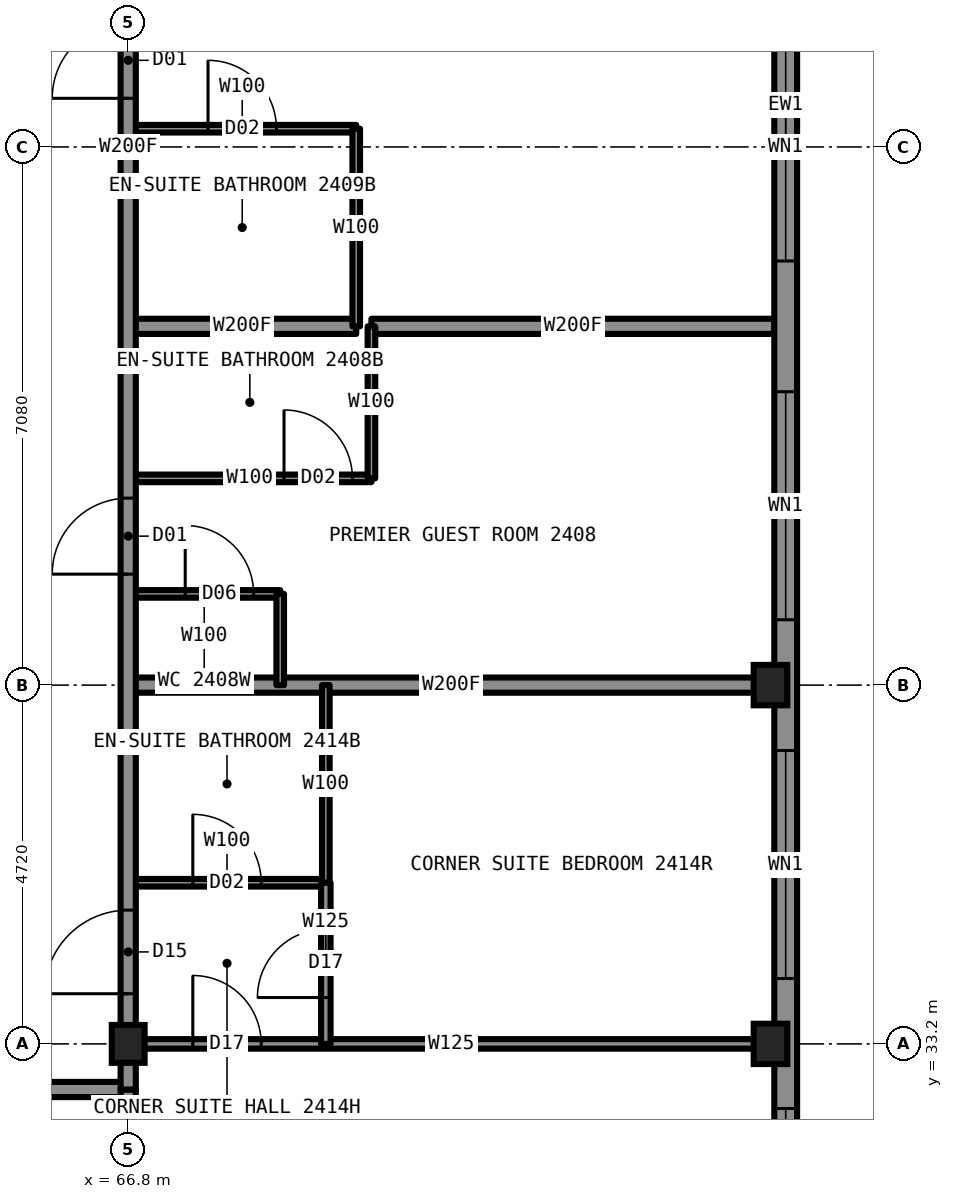
"""IFC4 building model, lengths in metres.
Left out: names, types, materials, properties, quantities, classifications, styles, units other than length and angle.
Written with IfcOpenShell. Run it as: python <this file> out.ifc"""

import sys

from ifc_helpers import new_model, si_unit, direction, frame, frame_2d, origin, origin_2d, place, context, subcontext, project, spatial, rectangle, i_section, extrude, element, fill, save


model = new_model("IFC4")
c1 = context("Model", 3, precision=1e-05, world=origin(), true_north=direction((0.0, 1.0)))
c2 = subcontext(c1, "Body", "Model", "MODEL_VIEW")
j1 = project(units=[si_unit("LENGTHUNIT", "METRE"), si_unit("PLANEANGLEUNIT", "RADIAN")], contexts=[c1])
p1 = place(None, origin())
s1 = spatial("IfcSite", under=j1, at=p1, CompositionType="ELEMENT")
p2 = place(p1, origin())
s2 = spatial("IfcBuilding", under=s1, at=p2, CompositionType="ELEMENT")
p3 = place(p2, frame((0.0, 0.0, 93.4)))
s3 = spatial("IfcBuildingStorey", under=s2, at=p3, CompositionType="ELEMENT", Elevation=93.4)
for number, where, z_axis, x_axis in (
    (1, (75.25, 33.2, 0.0), (0.0, 0.0, 1.0), (1.0, 0.0, 0.0)),
    (2, (75.25, 37.92, 0.0), (0.0, 0.0, 1.0), (1.0, 0.0, 0.0)),
):
    element("IfcColumn", number, at=place(p3, frame(where, z_axis=z_axis, x_axis=x_axis)), inside=s3, PredefinedType="COLUMN", context=c2, shape_type="SweptSolid", body=[
        extrude(i_section(OverallWidth=0.442, OverallDepth=0.531, WebThickness=0.066, FlangeThickness=0.106, at=origin_2d()), origin(), (0.0, 0.0, 1.0), 3.5),
    ])
p4 = place(p3, frame((66.8, 33.2, 0.0), z_axis=(0.0, 0.0, 1.0), x_axis=(1.0, 0.0, 0.0)))
e3 = element("IfcColumn", 3, at=p4, inside=s3, PredefinedType="COLUMN", context=c2, shape_type="SweptSolid", body=[
    extrude(i_section(OverallWidth=0.432, OverallDepth=0.498, WebThickness=0.056, FlangeThickness=0.089, at=origin_2d()), origin(), (0.0, 0.0, 1.0), 3.5),
])
p5 = place(p3, frame((66.8, 33.2, 0.0), z_axis=(0.0, 0.0, 1.0), x_axis=(1.0, 0.0, 0.0)))
e4 = element("IfcWall", 4, at=p5, inside=s3, PredefinedType="PARTITIONING", context=c2, shape_type="SweptSolid", body=[
    extrude(rectangle(XDim=8.5, YDim=0.125, at=frame_2d((4.25, 0.0))), origin(), (0.0, 0.0, 1.0), 2.573),
])
p6 = place(p5, frame((0.85, 0.0, 0.0)))
e5 = element("IfcOpeningElement", 5, at=p6, cuts=e4, PredefinedType="OPENING", context=c2, shape_type="SweptSolid", body=[
    extrude(rectangle(XDim=0.9, YDim=2.2, at=frame_2d((0.45, 1.1))), frame((0.0, 0.073, 0.0), z_axis=(0.0, -1.0, 0.0), x_axis=(1.0, 0.0, 0.0)), (0.0, 0.0, 1.0), 0.145),
])
p7 = place(p3, frame((43.2, 32.6, 0.0), z_axis=(0.0, 0.0, 1.0), x_axis=(1.0, 0.0, 0.0)))
e6 = element("IfcWall", 6, at=p7, inside=s3, PredefinedType="PARTITIONING", context=c2, shape_type="SweptSolid", body=[
    extrude(rectangle(XDim=23.6, YDim=0.2, at=frame_2d((11.8, 0.0))), origin(), (0.0, 0.0, 1.0), 3.33),
])
p8 = place(p7, frame((3.0, 0.0, 0.0)))
e7 = element("IfcOpeningElement", 7, at=p8, cuts=e6, PredefinedType="OPENING", context=c2, shape_type="SweptSolid", body=[
    extrude(rectangle(XDim=1.0, YDim=2.2, at=frame_2d((0.5, 1.1))), frame((0.0, 0.11, 0.0), z_axis=(0.0, -1.0, 0.0), x_axis=(1.0, 0.0, 0.0)), (0.0, 0.0, 1.0), 0.22),
])
p9 = place(p7, frame((9.84, 0.0, 0.0)))
e8 = element("IfcOpeningElement", 8, at=p9, cuts=e6, PredefinedType="OPENING", context=c2, shape_type="SweptSolid", body=[
    extrude(rectangle(XDim=1.0, YDim=2.2, at=frame_2d((0.5, 1.1))), frame((0.0, 0.11, 0.0), z_axis=(0.0, -1.0, 0.0), x_axis=(1.0, 0.0, 0.0)), (0.0, 0.0, 1.0), 0.22),
])
p10 = place(p7, frame((17.16, 0.0, 0.0)))
e9 = element("IfcOpeningElement", 9, at=p10, cuts=e6, PredefinedType="OPENING", context=c2, shape_type="SweptSolid", body=[
    extrude(rectangle(XDim=1.0, YDim=2.2, at=frame_2d((0.5, 1.1))), frame((0.0, 0.11, 0.0), z_axis=(0.0, -1.0, 0.0), x_axis=(1.0, 0.0, 0.0)), (0.0, 0.0, 1.0), 0.22),
])
p11 = place(p3, frame((66.8, 42.64, 0.0), z_axis=(0.0, 0.0, 1.0), x_axis=(1.0, 0.0, 0.0)))
e10 = element("IfcWall", 10, at=p11, inside=s3, PredefinedType="PARTITIONING", context=c2, shape_type="SweptSolid", body=[
    extrude(rectangle(XDim=3.0, YDim=0.2, at=frame_2d((1.5, 0.0))), origin(), (0.0, 0.0, 1.0), 2.731),
])
p12 = place(p3, frame((70.0, 42.64, 0.0), z_axis=(0.0, 0.0, 1.0), x_axis=(1.0, 0.0, 0.0)))
e11 = element("IfcWall", 11, at=p12, inside=s3, PredefinedType="PARTITIONING", context=c2, shape_type="SweptSolid", body=[
    extrude(rectangle(XDim=5.3, YDim=0.2, at=frame_2d((2.65, 0.0))), origin(), (0.0, 0.0, 1.0), 2.731),
])
p13 = place(p3, frame((66.8, 40.64, 0.0), z_axis=(0.0, 0.0, 1.0), x_axis=(1.0, 0.0, 0.0)))
e12 = element("IfcWall", 12, at=p13, inside=s3, PredefinedType="PARTITIONING", context=c2, shape_type="SweptSolid", body=[
    extrude(rectangle(XDim=3.2, YDim=0.1, at=frame_2d((1.6, 0.0))), origin(), (0.0, 0.0, 1.0), 3.33),
])
p14 = place(p13, frame((2.05, 0.0, 0.0)))
e13 = element("IfcOpeningElement", 13, at=p14, cuts=e12, PredefinedType="OPENING", context=c2, shape_type="SweptSolid", body=[
    extrude(rectangle(XDim=0.9, YDim=2.1, at=frame_2d((0.45, 1.05))), frame((0.0, 0.06, 0.0), z_axis=(0.0, -1.0, 0.0), x_axis=(1.0, 0.0, 0.0)), (0.0, 0.0, 1.0), 0.12),
])
p15 = place(p3, frame((66.8, 39.12, 0.0), z_axis=(0.0, 0.0, 1.0), x_axis=(1.0, 0.0, 0.0)))
e14 = element("IfcWall", 14, at=p15, inside=s3, PredefinedType="PARTITIONING", context=c2, shape_type="SweptSolid", body=[
    extrude(rectangle(XDim=2.0, YDim=0.1, at=frame_2d((1.0, 0.0))), origin(), (0.0, 0.0, 1.0), 3.33),
])
p16 = place(p15, frame((0.75, 0.0, 0.0)))
e15 = element("IfcOpeningElement", 15, at=p16, cuts=e14, PredefinedType="OPENING", context=c2, shape_type="SweptSolid", body=[
    extrude(rectangle(XDim=0.9, YDim=2.1, at=frame_2d((0.45, 1.05))), frame((0.0, 0.06, 0.0), z_axis=(0.0, -1.0, 0.0), x_axis=(1.0, 0.0, 0.0)), (0.0, 0.0, 1.0), 0.12),
])
p17 = place(p3, frame((66.8, 37.92, 0.0), z_axis=(0.0, 0.0, 1.0), x_axis=(1.0, 0.0, 0.0)))
e16 = element("IfcWall", 16, at=p17, inside=s3, PredefinedType="PARTITIONING", context=c2, shape_type="SweptSolid", body=[
    extrude(rectangle(XDim=8.5, YDim=0.2, at=frame_2d((4.25, 0.0))), origin(), (0.0, 0.0, 1.0), 2.573),
])
p18 = place(p3, frame((66.8, 35.32, 0.0), z_axis=(0.0, 0.0, 1.0), x_axis=(1.0, 0.0, 0.0)))
e17 = element("IfcWall", 17, at=p18, inside=s3, PredefinedType="PARTITIONING", context=c2, shape_type="SweptSolid", body=[
    extrude(rectangle(XDim=2.6, YDim=0.1, at=frame_2d((1.3, 0.0))), origin(), (0.0, 0.0, 1.0), 3.33),
])
p19 = place(p18, frame((0.85, 0.0, 0.0)))
e18 = element("IfcOpeningElement", 18, at=p19, cuts=e17, PredefinedType="OPENING", context=c2, shape_type="SweptSolid", body=[
    extrude(rectangle(XDim=0.9, YDim=2.1, at=frame_2d((0.45, 1.05))), frame((0.0, 0.06, 0.0), z_axis=(0.0, -1.0, 0.0), x_axis=(1.0, 0.0, 0.0)), (0.0, 0.0, 1.0), 0.12),
])
p20 = place(p3, frame((66.8, 45.24, 0.0), z_axis=(0.0, 0.0, 1.0), x_axis=(1.0, 0.0, 0.0)))
e19 = element("IfcWall", 19, at=p20, inside=s3, PredefinedType="PARTITIONING", context=c2, shape_type="SweptSolid", body=[
    extrude(rectangle(XDim=3.0, YDim=0.1, at=frame_2d((1.5, 0.0))), origin(), (0.0, 0.0, 1.0), 3.33),
])
p21 = place(p20, frame((1.05, 0.0, 0.0)))
e20 = element("IfcOpeningElement", 20, at=p21, cuts=e19, PredefinedType="OPENING", context=c2, shape_type="SweptSolid", body=[
    extrude(rectangle(XDim=0.9, YDim=2.1, at=frame_2d((0.45, 1.05))), frame((0.0, 0.06, 0.0), z_axis=(0.0, -1.0, 0.0), x_axis=(1.0, 0.0, 0.0)), (0.0, 0.0, 1.0), 0.12),
])
p22 = place(p3, frame((66.8, 33.22, 0.0), z_axis=(0.0, 0.0, 1.0), x_axis=(0.0, 1.0, 0.0)))
e21 = element("IfcWall", 21, at=p22, inside=s3, PredefinedType="PARTITIONING", context=c2, shape_type="SweptSolid", body=[
    extrude(rectangle(XDim=23.56, YDim=0.2, at=frame_2d((11.78, 0.0))), origin(), (0.0, 0.0, 1.0), 3.33),
])
p23 = place(p22, frame((6.16, 0.0, 0.0)))
e22 = element("IfcOpeningElement", 22, at=p23, cuts=e21, PredefinedType="OPENING", context=c2, shape_type="SweptSolid", body=[
    extrude(rectangle(XDim=1.0, YDim=2.2, at=frame_2d((0.5, 1.1))), frame((0.0, 0.11, 0.0), z_axis=(0.0, -1.0, 0.0), x_axis=(1.0, 0.0, 0.0)), (0.0, 0.0, 1.0), 0.22),
])
p24 = place(p22, frame((12.42, 0.0, 0.0)))
e23 = element("IfcOpeningElement", 23, at=p24, cuts=e21, PredefinedType="OPENING", context=c2, shape_type="SweptSolid", body=[
    extrude(rectangle(XDim=1.0, YDim=2.2, at=frame_2d((0.5, 1.1))), frame((0.0, 0.11, 0.0), z_axis=(0.0, -1.0, 0.0), x_axis=(1.0, 0.0, 0.0)), (0.0, 0.0, 1.0), 0.22),
])
p25 = place(p22, frame((21.82, 0.0, 0.0)))
e24 = element("IfcOpeningElement", 24, at=p25, cuts=e21, PredefinedType="OPENING", context=c2, shape_type="SweptSolid", body=[
    extrude(rectangle(XDim=1.1, YDim=2.2, at=frame_2d((0.55, 1.1))), frame((0.0, 0.11, 0.0), z_axis=(0.0, -1.0, 0.0), x_axis=(1.0, 0.0, 0.0)), (0.0, 0.0, 1.0), 0.22),
])
p26 = place(p22, frame((0.64, 0.0, 0.0)))
e25 = element("IfcOpeningElement", 25, at=p26, cuts=e21, PredefinedType="OPENING", context=c2, shape_type="SweptSolid", body=[
    extrude(rectangle(XDim=1.1, YDim=2.2, at=frame_2d((0.55, 1.1))), frame((0.0, 0.11, 0.0), z_axis=(0.0, -1.0, 0.0), x_axis=(1.0, 0.0, 0.0)), (0.0, 0.0, 1.0), 0.22),
])
p27 = place(p3, frame((66.8, 24.7, 0.0), z_axis=(0.0, 0.0, 1.0), x_axis=(0.0, 1.0, 0.0)))
e26 = element("IfcWall", 26, at=p27, inside=s3, PredefinedType="PARTITIONING", context=c2, shape_type="SweptSolid", body=[
    extrude(rectangle(XDim=7.9, YDim=0.2, at=frame_2d((3.95, 0.0))), origin(), (0.0, 0.0, 1.0), 2.573),
])
p28 = place(p3, frame((68.8, 37.92, 0.0), z_axis=(0.0, 0.0, 1.0), x_axis=(0.0, 1.0, 0.0)))
e27 = element("IfcWall", 27, at=p28, inside=s3, PredefinedType="PARTITIONING", context=c2, shape_type="SweptSolid", body=[
    extrude(rectangle(XDim=1.2, YDim=0.1, at=frame_2d((0.6, 0.0))), origin(), (0.0, 0.0, 1.0), 3.33),
])
p29 = place(p3, frame((69.4, 35.32, 0.0), z_axis=(0.0, 0.0, 1.0), x_axis=(0.0, 1.0, 0.0)))
e28 = element("IfcWall", 28, at=p29, inside=s3, PredefinedType="PARTITIONING", context=c2, shape_type="SweptSolid", body=[
    extrude(rectangle(XDim=2.6, YDim=0.1, at=frame_2d((1.3, 0.0))), origin(), (0.0, 0.0, 1.0), 3.33),
])
p30 = place(p3, frame((69.4, 33.2, 0.0), z_axis=(0.0, 0.0, 1.0), x_axis=(0.0, 1.0, 0.0)))
e29 = element("IfcWall", 29, at=p30, inside=s3, PredefinedType="PARTITIONING", context=c2, shape_type="SweptSolid", body=[
    extrude(rectangle(XDim=2.12, YDim=0.125, at=frame_2d((1.06, 0.0))), origin(), (0.0, 0.0, 1.0), 3.33),
])
p31 = place(p30, frame((0.61, 0.0, 0.0)))
e30 = element("IfcOpeningElement", 30, at=p31, cuts=e29, PredefinedType="OPENING", context=c2, shape_type="SweptSolid", body=[
    extrude(rectangle(XDim=0.9, YDim=2.2, at=frame_2d((0.45, 1.1))), frame((0.0, 0.073, 0.0), z_axis=(0.0, -1.0, 0.0), x_axis=(1.0, 0.0, 0.0)), (0.0, 0.0, 1.0), 0.145),
])
p32 = place(p3, frame((69.8, 42.64, 0.0), z_axis=(0.0, 0.0, 1.0), x_axis=(0.0, 1.0, 0.0)))
e31 = element("IfcWall", 31, at=p32, inside=s3, PredefinedType="PARTITIONING", context=c2, shape_type="SweptSolid", body=[
    extrude(rectangle(XDim=2.6, YDim=0.1, at=frame_2d((1.3, 0.0))), origin(), (0.0, 0.0, 1.0), 3.33),
])
p33 = place(p3, frame((70.0, 40.64, 0.0), z_axis=(0.0, 0.0, 1.0), x_axis=(0.0, 1.0, 0.0)))
e32 = element("IfcWall", 32, at=p33, inside=s3, PredefinedType="PARTITIONING", context=c2, shape_type="SweptSolid", body=[
    extrude(rectangle(XDim=2.0, YDim=0.1, at=frame_2d((1.0, 0.0))), origin(), (0.0, 0.0, 1.0), 3.33),
])
p34 = place(p3, frame((75.45, 29.9, 0.0), z_axis=(0.0, 0.0, 1.0), x_axis=(0.0, 1.0, 0.0)))
e33 = element("IfcWall", 33, at=p34, inside=s3, PredefinedType="SOLIDWALL", context=c2, shape_type="SweptSolid", body=[
    extrude(rectangle(XDim=30.2, YDim=0.3, at=frame_2d((15.1, 0.0))), origin(), (0.0, 0.0, 1.0), 2.83),
])
p35 = place(p34, frame((0.85, 0.0, 0.5)))
e34 = element("IfcOpeningElement", 34, at=p35, cuts=e33, PredefinedType="OPENING", context=c2, shape_type="SweptSolid", body=[
    extrude(rectangle(XDim=1.6, YDim=2.0, at=frame_2d((0.8, 1.0))), frame((0.0, 0.16, 0.0), z_axis=(0.0, -1.0, 0.0), x_axis=(1.0, 0.0, 0.0)), (0.0, 0.0, 1.0), 0.32),
])
p36 = place(p34, frame((4.16, 0.0, 0.5)))
e35 = element("IfcOpeningElement", 35, at=p36, cuts=e33, PredefinedType="OPENING", context=c2, shape_type="SweptSolid", body=[
    extrude(rectangle(XDim=3.0, YDim=2.0, at=frame_2d((1.5, 1.0))), frame((0.0, 0.16, 0.0), z_axis=(0.0, -1.0, 0.0), x_axis=(1.0, 0.0, 0.0)), (0.0, 0.0, 1.0), 0.32),
])
p37 = place(p34, frame((8.88, 0.0, 0.5)))
e36 = element("IfcOpeningElement", 36, at=p37, cuts=e33, PredefinedType="OPENING", context=c2, shape_type="SweptSolid", body=[
    extrude(rectangle(XDim=3.0, YDim=2.0, at=frame_2d((1.5, 1.0))), frame((0.0, 0.16, 0.0), z_axis=(0.0, -1.0, 0.0), x_axis=(1.0, 0.0, 0.0)), (0.0, 0.0, 1.0), 0.32),
])
p38 = place(p34, frame((13.6, 0.0, 0.5)))
e37 = element("IfcOpeningElement", 37, at=p38, cuts=e33, PredefinedType="OPENING", context=c2, shape_type="SweptSolid", body=[
    extrude(rectangle(XDim=3.0, YDim=2.0, at=frame_2d((1.5, 1.0))), frame((0.0, 0.16, 0.0), z_axis=(0.0, -1.0, 0.0), x_axis=(1.0, 0.0, 0.0)), (0.0, 0.0, 1.0), 0.32),
])
p39 = place(p34, frame((18.32, 0.0, 0.5)))
e38 = element("IfcOpeningElement", 38, at=p39, cuts=e33, PredefinedType="OPENING", context=c2, shape_type="SweptSolid", body=[
    extrude(rectangle(XDim=3.0, YDim=2.0, at=frame_2d((1.5, 1.0))), frame((0.0, 0.16, 0.0), z_axis=(0.0, -1.0, 0.0), x_axis=(1.0, 0.0, 0.0)), (0.0, 0.0, 1.0), 0.32),
])
p40 = place(p34, frame((23.04, 0.0, 0.5)))
e39 = element("IfcOpeningElement", 39, at=p40, cuts=e33, PredefinedType="OPENING", context=c2, shape_type="SweptSolid", body=[
    extrude(rectangle(XDim=3.0, YDim=2.0, at=frame_2d((1.5, 1.0))), frame((0.0, 0.16, 0.0), z_axis=(0.0, -1.0, 0.0), x_axis=(1.0, 0.0, 0.0)), (0.0, 0.0, 1.0), 0.32),
])
p41 = place(p34, frame((27.75, 0.0, 0.5)))
e40 = element("IfcOpeningElement", 40, at=p41, cuts=e33, PredefinedType="OPENING", context=c2, shape_type="SweptSolid", body=[
    extrude(rectangle(XDim=1.6, YDim=2.0, at=frame_2d((0.8, 1.0))), frame((0.0, 0.16, 0.0), z_axis=(0.0, -1.0, 0.0), x_axis=(1.0, 0.0, 0.0)), (0.0, 0.0, 1.0), 0.32),
])
p42 = place(p3, frame((66.8, 32.6, 0.0), z_axis=(0.0, 0.0, 1.0), x_axis=(0.0, 1.0, 0.0)))
e41 = element("IfcWall", 41, at=p42, inside=s3, PredefinedType="PARTITIONING", context=c2, shape_type="SweptSolid", body=[
    extrude(rectangle(XDim=0.62, YDim=0.2, at=frame_2d((0.31, 0.0))), origin(), (0.0, 0.0, 1.0), 2.573),
])
p43 = place(p23, origin())
e42 = element("IfcDoor", 42, at=p43, inside=s3, OperationType="SINGLE_SWING_LEFT", PredefinedType="DOOR", context=c2, shape_type="SweptSolid", body=[
    extrude(rectangle(XDim=1.0, YDim=2.2, at=frame_2d((0.5, 1.1))), frame((0.0, 0.025, 0.0), z_axis=(0.0, -1.0, 0.0), x_axis=(1.0, 0.0, 0.0)), (0.0, 0.0, 1.0), 0.05),
])
fill(e22, e42)
p44 = place(p14, origin())
e43 = element("IfcDoor", 43, at=p44, inside=s3, OperationType="SINGLE_SWING_RIGHT", PredefinedType="DOOR", context=c2, shape_type="SweptSolid", body=[
    extrude(rectangle(XDim=0.9, YDim=2.1, at=frame_2d((0.45, 1.05))), frame((0.0, 0.025, 0.0), z_axis=(0.0, -1.0, 0.0), x_axis=(1.0, 0.0, 0.0)), (0.0, 0.0, 1.0), 0.05),
])
fill(e13, e43)
p45 = place(p16, origin())
e44 = element("IfcDoor", 44, at=p45, inside=s3, OperationType="SINGLE_SWING_LEFT", PredefinedType="DOOR", context=c2, shape_type="SweptSolid", body=[
    extrude(rectangle(XDim=0.9, YDim=2.1, at=frame_2d((0.45, 1.05))), frame((0.0, 0.025, 0.0), z_axis=(0.0, -1.0, 0.0), x_axis=(1.0, 0.0, 0.0)), (0.0, 0.0, 1.0), 0.05),
])
fill(e15, e44)
p46 = place(p24, origin())
e45 = element("IfcDoor", 45, at=p46, inside=s3, OperationType="SINGLE_SWING_LEFT", PredefinedType="DOOR", context=c2, shape_type="SweptSolid", body=[
    extrude(rectangle(XDim=1.0, YDim=2.2, at=frame_2d((0.5, 1.1))), frame((0.0, 0.025, 0.0), z_axis=(0.0, -1.0, 0.0), x_axis=(1.0, 0.0, 0.0)), (0.0, 0.0, 1.0), 0.05),
])
fill(e23, e45)
p47 = place(p21, origin())
e46 = element("IfcDoor", 46, at=p47, inside=s3, OperationType="SINGLE_SWING_RIGHT", PredefinedType="DOOR", context=c2, shape_type="SweptSolid", body=[
    extrude(rectangle(XDim=0.9, YDim=2.1, at=frame_2d((0.45, 1.05))), frame((0.0, 0.025, 0.0), z_axis=(0.0, -1.0, 0.0), x_axis=(1.0, 0.0, 0.0)), (0.0, 0.0, 1.0), 0.05),
])
fill(e20, e46)
p48 = place(p6, origin())
e47 = element("IfcDoor", 47, at=p48, inside=s3, OperationType="SINGLE_SWING_LEFT", PredefinedType="DOOR", context=c2, shape_type="SweptSolid", body=[
    extrude(rectangle(XDim=0.9, YDim=2.2, at=frame_2d((0.45, 1.1))), frame((0.0, 0.025, 0.0), z_axis=(0.0, -1.0, 0.0), x_axis=(1.0, 0.0, 0.0)), (0.0, 0.0, 1.0), 0.05),
])
fill(e5, e47)
p49 = place(p19, origin())
e48 = element("IfcDoor", 48, at=p49, inside=s3, OperationType="SINGLE_SWING_RIGHT", PredefinedType="DOOR", context=c2, shape_type="SweptSolid", body=[
    extrude(rectangle(XDim=0.9, YDim=2.1, at=frame_2d((0.45, 1.05))), frame((0.0, 0.025, 0.0), z_axis=(0.0, -1.0, 0.0), x_axis=(1.0, 0.0, 0.0)), (0.0, 0.0, 1.0), 0.05),
])
fill(e18, e48)
p50 = place(p26, origin())
e49 = element("IfcDoor", 49, at=p50, inside=s3, OperationType="SINGLE_SWING_LEFT", PredefinedType="DOOR", context=c2, shape_type="SweptSolid", body=[
    extrude(rectangle(XDim=1.1, YDim=2.2, at=frame_2d((0.55, 1.1))), frame((0.0, 0.025, 0.0), z_axis=(0.0, -1.0, 0.0), x_axis=(1.0, 0.0, 0.0)), (0.0, 0.0, 1.0), 0.05),
])
fill(e25, e49)
p51 = place(p31, origin())
e50 = element("IfcDoor", 50, at=p51, inside=s3, OperationType="SINGLE_SWING_LEFT", PredefinedType="DOOR", context=c2, shape_type="SweptSolid", body=[
    extrude(rectangle(XDim=0.9, YDim=2.2, at=frame_2d((0.45, 1.1))), frame((0.0, 0.025, 0.0), z_axis=(0.0, -1.0, 0.0), x_axis=(1.0, 0.0, 0.0)), (0.0, 0.0, 1.0), 0.05),
])
fill(e30, e50)
p52 = place(p35, origin())
e51 = element("IfcWindow", 51, at=p52, inside=s3, PartitioningType="SINGLE_PANEL", PredefinedType="WINDOW", context=c2, shape_type="SweptSolid", body=[
    extrude(rectangle(XDim=1.6, YDim=2.0, at=frame_2d((0.8, 1.0))), frame((0.0, 0.03, 0.0), z_axis=(0.0, -1.0, 0.0), x_axis=(1.0, 0.0, 0.0)), (0.0, 0.0, 1.0), 0.06),
])
fill(e34, e51)
p53 = place(p36, origin())
e52 = element("IfcWindow", 52, at=p53, inside=s3, PartitioningType="SINGLE_PANEL", PredefinedType="WINDOW", context=c2, shape_type="SweptSolid", body=[
    extrude(rectangle(XDim=3.0, YDim=2.0, at=frame_2d((1.5, 1.0))), frame((0.0, 0.03, 0.0), z_axis=(0.0, -1.0, 0.0), x_axis=(1.0, 0.0, 0.0)), (0.0, 0.0, 1.0), 0.06),
])
fill(e35, e52)
p54 = place(p37, origin())
e53 = element("IfcWindow", 53, at=p54, inside=s3, PartitioningType="SINGLE_PANEL", PredefinedType="WINDOW", context=c2, shape_type="SweptSolid", body=[
    extrude(rectangle(XDim=3.0, YDim=2.0, at=frame_2d((1.5, 1.0))), frame((0.0, 0.03, 0.0), z_axis=(0.0, -1.0, 0.0), x_axis=(1.0, 0.0, 0.0)), (0.0, 0.0, 1.0), 0.06),
])
fill(e36, e53)
p55 = place(p38, origin())
e54 = element("IfcWindow", 54, at=p55, inside=s3, PartitioningType="SINGLE_PANEL", PredefinedType="WINDOW", context=c2, shape_type="SweptSolid", body=[
    extrude(rectangle(XDim=3.0, YDim=2.0, at=frame_2d((1.5, 1.0))), frame((0.0, 0.03, 0.0), z_axis=(0.0, -1.0, 0.0), x_axis=(1.0, 0.0, 0.0)), (0.0, 0.0, 1.0), 0.06),
])
fill(e37, e54)
save(model, sys.argv[1])
